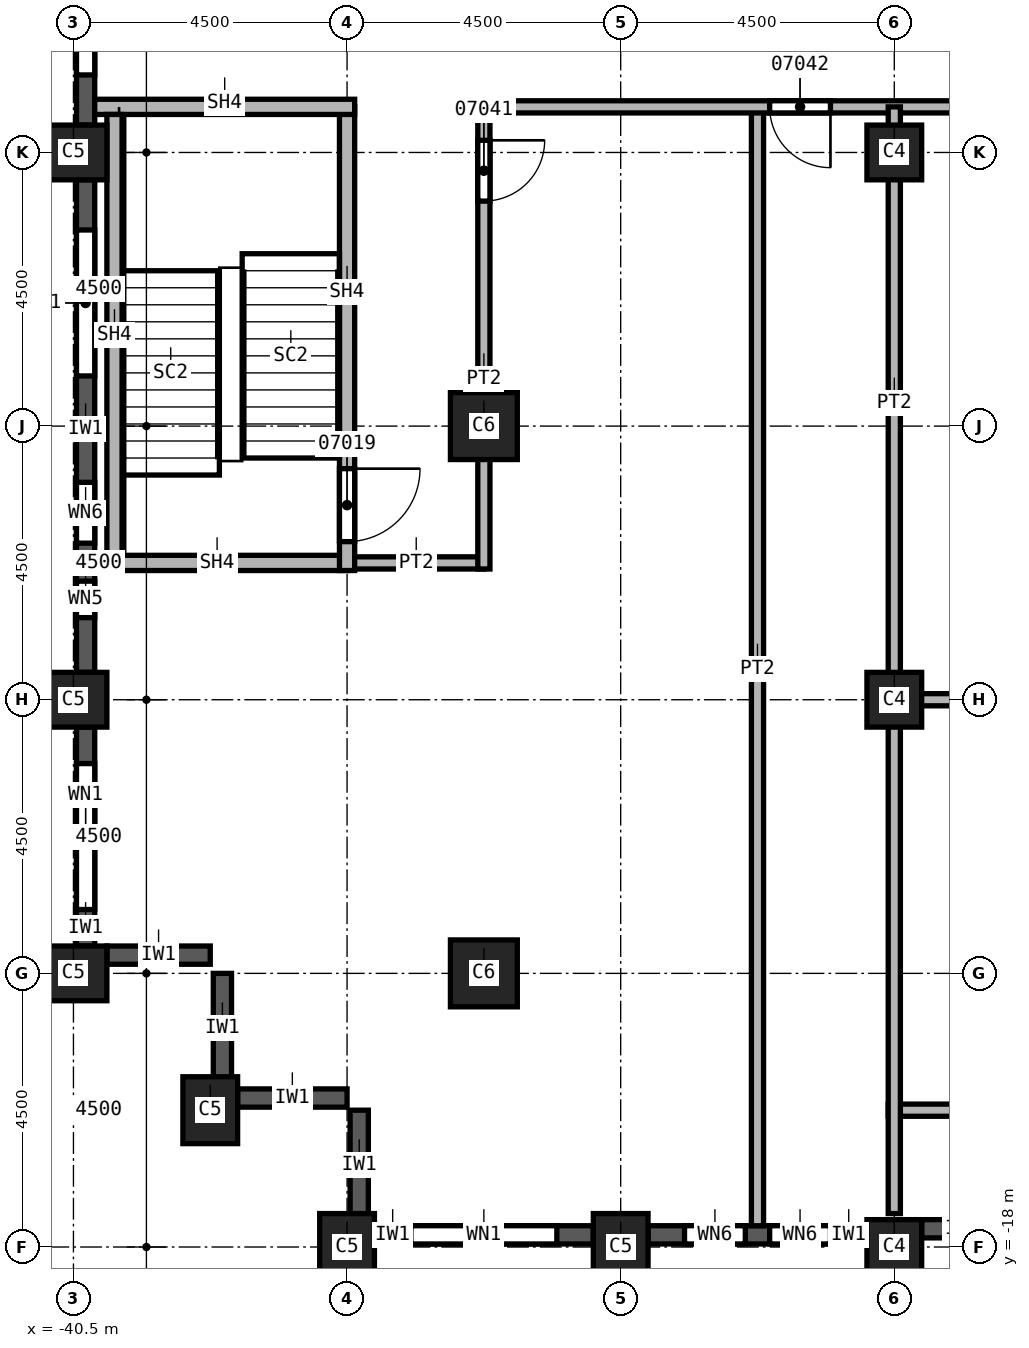
"""IFC4 building model, lengths in metres.
Left out: names, types, materials, properties, quantities, classifications, styles, units other than length and angle.
Written with IfcOpenShell. Run it as: python <this file> out.ifc"""

import sys

from ifc_helpers import new_model, si_unit, direction, frame, frame_2d, origin, origin_2d, place, context, subcontext, project, spatial, rectangle, extrude, element, fill, save


model = new_model("IFC4")
c1 = context("Model", 3, precision=1e-05, world=origin(), true_north=direction((0.0, 1.0)))
c2 = subcontext(c1, "Body", "Model", "MODEL_VIEW")
j1 = project(units=[si_unit("LENGTHUNIT", "METRE"), si_unit("PLANEANGLEUNIT", "RADIAN")], contexts=[c1])
p1 = place(None, origin())
s1 = spatial("IfcSite", under=j1, at=p1, CompositionType="ELEMENT")
p2 = place(p1, origin())
s2 = spatial("IfcBuilding", under=s1, at=p2, CompositionType="ELEMENT")
p3 = place(p2, frame((0.0, 0.0, 138.0)))
s3 = spatial("IfcBuildingStorey", under=s2, at=p3, CompositionType="ELEMENT", Elevation=138.0)
for number, where, z_axis, x_axis in (
    (1, (-40.5, 0.0, 0.0), (0.0, 0.0, 1.0), (0.0, 1.0, 0.0)),
    (2, (-40.5, -9.0, 0.0), (0.0, 0.0, 1.0), (0.0, 1.0, 0.0)),
    (3, (-40.5, -13.5, 0.0), (0.0, 0.0, 1.0), (0.0, 1.0, 0.0)),
    (4, (-38.25, -15.75, 0.0), (0.0, 0.0, 1.0), (1.0, 0.0, 0.0)),
    (5, (-31.5, -18.0, 0.0), (0.0, 0.0, 1.0), (1.0, 0.0, 0.0)),
    (6, (-36.0, -18.0, 0.0), (0.0, 0.0, 1.0), (1.0, 0.0, 0.0)),
):
    element("IfcColumn", number, at=place(p3, frame(where, z_axis=z_axis, x_axis=x_axis)), inside=s3, PredefinedType="COLUMN", context=c2, shape_type="SweptSolid", body=[
        extrude(rectangle(XDim=0.9, YDim=1.1, at=origin_2d()), origin(), (0.0, 0.0, 1.0), 3.7),
    ])
for number, where, z_axis, x_axis in (
    (7, (-33.75, -4.5, 0.0), (0.0, 0.0, 1.0), (1.0, 0.0, 0.0)),
    (8, (-33.75, -13.5, 0.0), (0.0, 0.0, 1.0), (1.0, 0.0, 0.0)),
):
    element("IfcColumn", number, at=place(p3, frame(where, z_axis=z_axis, x_axis=x_axis)), inside=s3, PredefinedType="COLUMN", context=c2, shape_type="SweptSolid", body=[
        extrude(rectangle(XDim=1.1, YDim=1.1, at=origin_2d()), origin(), (0.0, 0.0, 1.0), 3.7),
    ])
for number, where, z_axis, x_axis in (
    (9, (-27.0, 0.0, 0.0), (0.0, 0.0, 1.0), (1.0, 0.0, 0.0)),
    (10, (-27.0, -9.0, 0.0), (0.0, 0.0, 1.0), (1.0, 0.0, 0.0)),
    (11, (-27.0, -18.0, 0.0), (0.0, 0.0, 1.0), (1.0, 0.0, 0.0)),
):
    element("IfcColumn", number, at=place(p3, frame(where, z_axis=z_axis, x_axis=x_axis)), inside=s3, PredefinedType="COLUMN", context=c2, shape_type="SweptSolid", body=[
        extrude(rectangle(XDim=0.9, YDim=0.9, at=origin_2d()), origin(), (0.0, 0.0, 1.0), 3.7),
    ])
p4 = place(p3, frame((-39.95, -13.2, 0.0), z_axis=(0.0, 0.0, 1.0), x_axis=(1.0, 0.0, 0.0)))
e12 = element("IfcWall", 12, at=p4, inside=s3, PredefinedType="SOLIDWALL", context=c2, shape_type="SweptSolid", body=[
    extrude(rectangle(XDim=1.7, YDim=0.3, at=frame_2d((0.85, 0.0))), origin(), (0.0, 0.0, 1.0), 3.1),
])
for number, where, z_axis, x_axis in (
    (13, (-38.05, -15.3, 0.0), (0.0, 0.0, 1.0), (0.0, 1.0, 0.0)),
    (14, (-37.8, -15.55, 0.0), (0.0, 0.0, 1.0), (1.0, 0.0, 0.0)),
    (15, (-35.8, -17.55, 0.0), (0.0, 0.0, 1.0), (0.0, 1.0, 0.0)),
):
    element("IfcWall", number, at=place(p3, frame(where, z_axis=z_axis, x_axis=x_axis)), inside=s3, PredefinedType="SOLIDWALL", context=c2, shape_type="SweptSolid", body=[
        extrude(rectangle(XDim=1.8, YDim=0.3, at=frame_2d((0.9, 0.0))), origin(), (0.0, 0.0, 1.0), 3.1),
    ])
p5 = place(p3, frame((-40.3, 8.55, 0.0), z_axis=(0.0, 0.0, 1.0), x_axis=(0.0, -1.0, 0.0)))
e16 = element("IfcWall", 16, at=p5, inside=s3, PredefinedType="SOLIDWALL", context=c2, shape_type="SweptSolid", body=[
    extrude(rectangle(XDim=8.1, YDim=0.3, at=frame_2d((4.05, 0.0))), origin(), (0.0, 0.0, 1.0), 3.1),
])
p6 = place(p5, frame((0.825, 0.0, 0.8)))
e17 = element("IfcOpeningElement", 17, at=p6, cuts=e16, PredefinedType="OPENING", context=c2, shape_type="SweptSolid", body=[
    extrude(rectangle(XDim=2.4, YDim=1.95, at=frame_2d((1.2, 0.975))), frame((0.0, 0.15, 0.0), z_axis=(0.0, -1.0, 0.0), x_axis=(1.0, 0.0, 0.0)), (0.0, 0.0, 1.0), 0.3),
])
p7 = place(p5, frame((4.875, 0.0, 0.8)))
e18 = element("IfcOpeningElement", 18, at=p7, cuts=e16, PredefinedType="OPENING", context=c2, shape_type="SweptSolid", body=[
    extrude(rectangle(XDim=2.4, YDim=1.95, at=frame_2d((1.2, 0.975))), frame((0.0, 0.15, 0.0), z_axis=(0.0, -1.0, 0.0), x_axis=(1.0, 0.0, 0.0)), (0.0, 0.0, 1.0), 0.3),
])
p8 = place(p3, frame((-40.3, -0.45, 0.0), z_axis=(0.0, 0.0, 1.0), x_axis=(0.0, -1.0, 0.0)))
e19 = element("IfcWall", 19, at=p8, inside=s3, PredefinedType="SOLIDWALL", context=c2, shape_type="SweptSolid", body=[
    extrude(rectangle(XDim=8.1, YDim=0.3, at=frame_2d((4.05, 0.0))), origin(), (0.0, 0.0, 1.0), 3.1),
])
p9 = place(p8, frame((0.825, 0.0, 0.8)))
e20 = element("IfcOpeningElement", 20, at=p9, cuts=e19, PredefinedType="OPENING", context=c2, shape_type="SweptSolid", body=[
    extrude(rectangle(XDim=2.4, YDim=1.95, at=frame_2d((1.2, 0.975))), frame((0.0, 0.15, 0.0), z_axis=(0.0, -1.0, 0.0), x_axis=(1.0, 0.0, 0.0)), (0.0, 0.0, 1.0), 0.3),
])
p10 = place(p8, frame((4.975, 0.0, 0.8)))
e21 = element("IfcOpeningElement", 21, at=p10, cuts=e19, PredefinedType="OPENING", context=c2, shape_type="SweptSolid", body=[
    extrude(rectangle(XDim=1.0, YDim=1.95, at=frame_2d((0.5, 0.975))), frame((0.0, 0.15, 0.0), z_axis=(0.0, -1.0, 0.0), x_axis=(1.0, 0.0, 0.0)), (0.0, 0.0, 1.0), 0.3),
])
p11 = place(p8, frame((6.6, 0.0, 0.8)))
e22 = element("IfcOpeningElement", 22, at=p11, cuts=e19, PredefinedType="OPENING", context=c2, shape_type="SweptSolid", body=[
    extrude(rectangle(XDim=0.6, YDim=1.95, at=frame_2d((0.3, 0.975))), frame((0.0, 0.15, 0.0), z_axis=(0.0, -1.0, 0.0), x_axis=(1.0, 0.0, 0.0)), (0.0, 0.0, 1.0), 0.3),
])
p12 = place(p3, frame((-40.3, -9.45, 0.0), z_axis=(0.0, 0.0, 1.0), x_axis=(0.0, -1.0, 0.0)))
e23 = element("IfcWall", 23, at=p12, inside=s3, PredefinedType="SOLIDWALL", context=c2, shape_type="SweptSolid", body=[
    extrude(rectangle(XDim=3.6, YDim=0.3, at=frame_2d((1.8, 0.0))), origin(), (0.0, 0.0, 1.0), 3.1),
])
p13 = place(p12, frame((0.6, 0.0, 0.8)))
e24 = element("IfcOpeningElement", 24, at=p13, cuts=e23, PredefinedType="OPENING", context=c2, shape_type="SweptSolid", body=[
    extrude(rectangle(XDim=2.4, YDim=1.95, at=frame_2d((1.2, 0.975))), frame((0.0, 0.15, 0.0), z_axis=(0.0, -1.0, 0.0), x_axis=(1.0, 0.0, 0.0)), (0.0, 0.0, 1.0), 0.3),
])
p14 = place(p3, frame((-35.55, -17.8, 0.0), z_axis=(0.0, 0.0, 1.0), x_axis=(1.0, 0.0, 0.0)))
e25 = element("IfcWall", 25, at=p14, inside=s3, PredefinedType="SOLIDWALL", context=c2, shape_type="SweptSolid", body=[
    extrude(rectangle(XDim=3.6, YDim=0.3, at=frame_2d((1.8, 0.0))), origin(), (0.0, 0.0, 1.0), 3.1),
])
p15 = place(p14, frame((0.6, 0.0, 0.8)))
e26 = element("IfcOpeningElement", 26, at=p15, cuts=e25, PredefinedType="OPENING", context=c2, shape_type="SweptSolid", body=[
    extrude(rectangle(XDim=2.4, YDim=1.95, at=frame_2d((1.2, 0.975))), frame((0.0, 0.15, 0.0), z_axis=(0.0, -1.0, 0.0), x_axis=(1.0, 0.0, 0.0)), (0.0, 0.0, 1.0), 0.3),
])
p16 = place(p3, frame((-31.05, -17.8, 0.0), z_axis=(0.0, 0.0, 1.0), x_axis=(1.0, 0.0, 0.0)))
e27 = element("IfcWall", 27, at=p16, inside=s3, PredefinedType="SOLIDWALL", context=c2, shape_type="SweptSolid", body=[
    extrude(rectangle(XDim=3.6, YDim=0.3, at=frame_2d((1.8, 0.0))), origin(), (0.0, 0.0, 1.0), 3.1),
])
p17 = place(p16, frame((0.6, 0.0, 0.8)))
e28 = element("IfcOpeningElement", 28, at=p17, cuts=e27, PredefinedType="OPENING", context=c2, shape_type="SweptSolid", body=[
    extrude(rectangle(XDim=1.0, YDim=1.95, at=frame_2d((0.5, 0.975))), frame((0.0, 0.15, 0.0), z_axis=(0.0, -1.0, 0.0), x_axis=(1.0, 0.0, 0.0)), (0.0, 0.0, 1.0), 0.3),
])
p18 = place(p16, frame((2.0, 0.0, 0.8)))
e29 = element("IfcOpeningElement", 29, at=p18, cuts=e27, PredefinedType="OPENING", context=c2, shape_type="SweptSolid", body=[
    extrude(rectangle(XDim=1.0, YDim=1.95, at=frame_2d((0.5, 0.975))), frame((0.0, 0.15, 0.0), z_axis=(0.0, -1.0, 0.0), x_axis=(1.0, 0.0, 0.0)), (0.0, 0.0, 1.0), 0.3),
])
p19 = place(p3, frame((-26.55, -17.7, 0.0), z_axis=(0.0, 0.0, 1.0), x_axis=(1.0, 0.0, 0.0)))
e30 = element("IfcWall", 30, at=p19, inside=s3, PredefinedType="SOLIDWALL", context=c2, shape_type="SweptSolid", body=[
    extrude(rectangle(XDim=1.35, YDim=0.3, at=frame_2d((0.675, 0.0))), origin(), (0.0, 0.0, 1.0), 3.1),
])
p20 = place(p3, frame((-33.75, -6.75, 0.0), z_axis=(0.0, 0.0, 1.0), x_axis=(-1.0, 0.0, 0.0)))
e31 = element("IfcWall", 31, at=p20, inside=s3, PredefinedType="PARTITIONING", context=c2, shape_type="SweptSolid", body=[
    extrude(rectangle(XDim=2.25, YDim=0.2, at=frame_2d((1.125, 0.0))), origin(), (0.0, 0.0, 1.0), 3.7),
])
p21 = place(p3, frame((-33.75, 0.75, 0.0), z_axis=(0.0, 0.0, 1.0), x_axis=(0.0, -1.0, 0.0)))
e32 = element("IfcWall", 32, at=p21, inside=s3, PredefinedType="PARTITIONING", context=c2, shape_type="SweptSolid", body=[
    extrude(rectangle(XDim=7.6, YDim=0.2, at=frame_2d((3.8, 0.0))), origin(), (0.0, 0.0, 1.0), 3.7),
])
p22 = place(p21, frame((0.55, 0.0, 0.0)))
e33 = element("IfcOpeningElement", 33, at=p22, cuts=e32, PredefinedType="OPENING", context=c2, shape_type="SweptSolid", body=[
    extrude(rectangle(XDim=1.0, YDim=2.1, at=frame_2d((0.5, 1.05))), frame((0.0, 0.1, 0.0), z_axis=(0.0, -1.0, 0.0), x_axis=(1.0, 0.0, 0.0)), (0.0, 0.0, 1.0), 0.2),
])
p23 = place(p3, frame((-29.25, 0.75, 0.0), z_axis=(0.0, 0.0, 1.0), x_axis=(0.0, -1.0, 0.0)))
e34 = element("IfcWall", 34, at=p23, inside=s3, PredefinedType="PARTITIONING", context=c2, shape_type="SweptSolid", body=[
    extrude(rectangle(XDim=18.4, YDim=0.2, at=frame_2d((9.2, 0.0))), origin(), (0.0, 0.0, 1.0), 3.7),
])
p24 = place(p3, frame((-15.4, 0.75, 0.0), z_axis=(0.0, 0.0, 1.0), x_axis=(-1.0, 0.0, 0.0)))
e35 = element("IfcWall", 35, at=p24, inside=s3, PredefinedType="PARTITIONING", context=c2, shape_type="SweptSolid", body=[
    extrude(rectangle(XDim=18.45, YDim=0.2, at=frame_2d((9.225, 0.0))), origin(), (0.0, 0.0, 1.0), 3.7),
])
p25 = place(p24, frame((5.35, 0.0, 0.0)))
e36 = element("IfcOpeningElement", 36, at=p25, cuts=e35, PredefinedType="OPENING", context=c2, shape_type="SweptSolid", body=[
    extrude(rectangle(XDim=1.0, YDim=2.1, at=frame_2d((0.5, 1.05))), frame((0.0, 0.1, 0.0), z_axis=(0.0, -1.0, 0.0), x_axis=(1.0, 0.0, 0.0)), (0.0, 0.0, 1.0), 0.2),
])
p26 = place(p24, frame((12.65, 0.0, 0.0)))
e37 = element("IfcOpeningElement", 37, at=p26, cuts=e35, PredefinedType="OPENING", context=c2, shape_type="SweptSolid", body=[
    extrude(rectangle(XDim=1.0, YDim=2.1, at=frame_2d((0.5, 1.05))), frame((0.0, 0.1, 0.0), z_axis=(0.0, -1.0, 0.0), x_axis=(1.0, 0.0, 0.0)), (0.0, 0.0, 1.0), 0.2),
])
for number, where, z_axis, x_axis in (
    (38, (-27.1, -15.75, 0.0), (0.0, 0.0, 1.0), (1.0, 0.0, 0.0)),
    (39, (-27.1, -9.0, 0.0), (0.0, 0.0, 1.0), (1.0, 0.0, 0.0)),
):
    element("IfcWall", number, at=place(p3, frame(where, z_axis=z_axis, x_axis=x_axis)), inside=s3, PredefinedType="PARTITIONING", context=c2, shape_type="SweptSolid", body=[
        extrude(rectangle(XDim=11.7, YDim=0.2, at=frame_2d((5.85, 0.0))), origin(), (0.0, 0.0, 1.0), 3.7),
    ])
p27 = place(p3, frame((-27.0, -17.45, 0.0), z_axis=(0.0, 0.0, 1.0), x_axis=(0.0, 1.0, 0.0)))
e40 = element("IfcWall", 40, at=p27, inside=s3, PredefinedType="PARTITIONING", context=c2, shape_type="SweptSolid", body=[
    extrude(rectangle(XDim=18.2, YDim=0.2, at=frame_2d((9.1, 0.0))), origin(), (0.0, 0.0, 1.0), 3.7),
])
p28 = place(p3, frame((-36.0, -6.75, 0.0), z_axis=(0.0, 0.0, 1.0), x_axis=(-1.0, 0.0, 0.0)))
e41 = element("IfcWall", 41, at=p28, inside=s3, PredefinedType="SOLIDWALL", context=c2, shape_type="SweptSolid", body=[
    extrude(rectangle(XDim=4.15, YDim=0.25, at=frame_2d((2.075, 0.0))), origin(), (0.0, 0.0, 1.0), 3.7),
])
p29 = place(p3, frame((-36.0, 0.75, 0.0), z_axis=(0.0, 0.0, 1.0), x_axis=(0.0, -1.0, 0.0)))
e42 = element("IfcWall", 42, at=p29, inside=s3, PredefinedType="SOLIDWALL", context=c2, shape_type="SweptSolid", body=[
    extrude(rectangle(XDim=7.625, YDim=0.25, at=frame_2d((3.812, 0.0))), origin(), (0.0, 0.0, 1.0), 3.7),
])
p30 = place(p29, frame((5.95, 0.0, 0.0)))
e43 = element("IfcOpeningElement", 43, at=p30, cuts=e42, PredefinedType="OPENING", context=c2, shape_type="SweptSolid", body=[
    extrude(rectangle(XDim=1.2, YDim=2.1, at=frame_2d((0.6, 1.05))), frame((0.0, 0.125, 0.0), z_axis=(0.0, -1.0, 0.0), x_axis=(1.0, 0.0, 0.0)), (0.0, 0.0, 1.0), 0.25),
])
p31 = place(p3, frame((-35.875, 0.75, 0.0), z_axis=(0.0, 0.0, 1.0), x_axis=(-1.0, 0.0, 0.0)))
e44 = element("IfcWall", 44, at=p31, inside=s3, PredefinedType="SOLIDWALL", context=c2, shape_type="SweptSolid", body=[
    extrude(rectangle(XDim=4.275, YDim=0.25, at=frame_2d((2.137, 0.0))), origin(), (0.0, 0.0, 1.0), 3.7),
])
p32 = place(p3, frame((-39.825, -6.625, 0.0), z_axis=(0.0, 0.0, 1.0), x_axis=(0.0, 1.0, 0.0)))
e45 = element("IfcWall", 45, at=p32, inside=s3, PredefinedType="SOLIDWALL", context=c2, shape_type="SweptSolid", body=[
    extrude(rectangle(XDim=7.25, YDim=0.25, at=frame_2d((3.625, 0.0))), origin(), (0.0, 0.0, 1.0), 3.7),
])
p33 = place(p7, origin())
e46 = element("IfcWindow", 46, at=p33, inside=s3, PartitioningType="SINGLE_PANEL", PredefinedType="WINDOW", context=c2, shape_type="SweptSolid", body=[
    extrude(rectangle(XDim=2.4, YDim=1.95, at=frame_2d((1.2, 0.975))), frame((0.0, 0.03, 0.0), z_axis=(0.0, -1.0, 0.0), x_axis=(1.0, 0.0, 0.0)), (0.0, 0.0, 1.0), 0.06),
])
fill(e18, e46)
p34 = place(p9, origin())
e47 = element("IfcWindow", 47, at=p34, inside=s3, PartitioningType="SINGLE_PANEL", PredefinedType="WINDOW", context=c2, shape_type="SweptSolid", body=[
    extrude(rectangle(XDim=2.4, YDim=1.95, at=frame_2d((1.2, 0.975))), frame((0.0, 0.03, 0.0), z_axis=(0.0, -1.0, 0.0), x_axis=(1.0, 0.0, 0.0)), (0.0, 0.0, 1.0), 0.06),
])
fill(e20, e47)
p35 = place(p13, origin())
e48 = element("IfcWindow", 48, at=p35, inside=s3, PartitioningType="SINGLE_PANEL", PredefinedType="WINDOW", context=c2, shape_type="SweptSolid", body=[
    extrude(rectangle(XDim=2.4, YDim=1.95, at=frame_2d((1.2, 0.975))), frame((0.0, 0.03, 0.0), z_axis=(0.0, -1.0, 0.0), x_axis=(1.0, 0.0, 0.0)), (0.0, 0.0, 1.0), 0.06),
])
fill(e24, e48)
p36 = place(p15, origin())
e49 = element("IfcWindow", 49, at=p36, inside=s3, PartitioningType="SINGLE_PANEL", PredefinedType="WINDOW", context=c2, shape_type="SweptSolid", body=[
    extrude(rectangle(XDim=2.4, YDim=1.95, at=frame_2d((1.2, 0.975))), frame((0.0, 0.03, 0.0), z_axis=(0.0, -1.0, 0.0), x_axis=(1.0, 0.0, 0.0)), (0.0, 0.0, 1.0), 0.06),
])
fill(e26, e49)
p37 = place(p30, origin())
e50 = element("IfcDoor", 50, at=p37, inside=s3, OperationType="SINGLE_SWING_RIGHT", PredefinedType="DOOR", context=c2, shape_type="SweptSolid", body=[
    extrude(rectangle(XDim=1.2, YDim=2.1, at=frame_2d((0.6, 1.05))), frame((0.0, 0.025, 0.0), z_axis=(0.0, -1.0, 0.0), x_axis=(1.0, 0.0, 0.0)), (0.0, 0.0, 1.0), 0.05),
])
fill(e43, e50)
p38 = place(p22, origin())
e51 = element("IfcDoor", 51, at=p38, inside=s3, OperationType="SINGLE_SWING_RIGHT", PredefinedType="DOOR", context=c2, shape_type="SweptSolid", body=[
    extrude(rectangle(XDim=1.0, YDim=2.1, at=frame_2d((0.5, 1.05))), frame((0.0, 0.025, 0.0), z_axis=(0.0, -1.0, 0.0), x_axis=(1.0, 0.0, 0.0)), (0.0, 0.0, 1.0), 0.05),
])
fill(e33, e51)
p39 = place(p26, origin())
e52 = element("IfcDoor", 52, at=p39, inside=s3, OperationType="SINGLE_SWING_LEFT", PredefinedType="DOOR", context=c2, shape_type="SweptSolid", body=[
    extrude(rectangle(XDim=1.0, YDim=2.1, at=frame_2d((0.5, 1.05))), frame((0.0, 0.025, 0.0), z_axis=(0.0, -1.0, 0.0), x_axis=(1.0, 0.0, 0.0)), (0.0, 0.0, 1.0), 0.05),
])
fill(e37, e52)
p40 = place(p10, origin())
e53 = element("IfcWindow", 53, at=p40, inside=s3, PartitioningType="SINGLE_PANEL", PredefinedType="WINDOW", context=c2, shape_type="SweptSolid", body=[
    extrude(rectangle(XDim=1.0, YDim=1.95, at=frame_2d((0.5, 0.975))), frame((0.0, 0.03, 0.0), z_axis=(0.0, -1.0, 0.0), x_axis=(1.0, 0.0, 0.0)), (0.0, 0.0, 1.0), 0.06),
])
fill(e21, e53)
p41 = place(p11, origin())
e54 = element("IfcWindow", 54, at=p41, inside=s3, PartitioningType="SINGLE_PANEL", PredefinedType="WINDOW", context=c2, shape_type="SweptSolid", body=[
    extrude(rectangle(XDim=0.6, YDim=1.95, at=frame_2d((0.3, 0.975))), frame((0.0, 0.03, 0.0), z_axis=(0.0, -1.0, 0.0), x_axis=(1.0, 0.0, 0.0)), (0.0, 0.0, 1.0), 0.06),
])
fill(e22, e54)
p42 = place(p17, origin())
e55 = element("IfcWindow", 55, at=p42, inside=s3, PartitioningType="SINGLE_PANEL", PredefinedType="WINDOW", context=c2, shape_type="SweptSolid", body=[
    extrude(rectangle(XDim=1.0, YDim=1.95, at=frame_2d((0.5, 0.975))), frame((0.0, 0.03, 0.0), z_axis=(0.0, -1.0, 0.0), x_axis=(1.0, 0.0, 0.0)), (0.0, 0.0, 1.0), 0.06),
])
fill(e28, e55)
p43 = place(p18, origin())
e56 = element("IfcWindow", 56, at=p43, inside=s3, PartitioningType="SINGLE_PANEL", PredefinedType="WINDOW", context=c2, shape_type="SweptSolid", body=[
    extrude(rectangle(XDim=1.0, YDim=1.95, at=frame_2d((0.5, 0.975))), frame((0.0, 0.03, 0.0), z_axis=(0.0, -1.0, 0.0), x_axis=(1.0, 0.0, 0.0)), (0.0, 0.0, 1.0), 0.06),
])
fill(e29, e56)
save(model, sys.argv[1])
